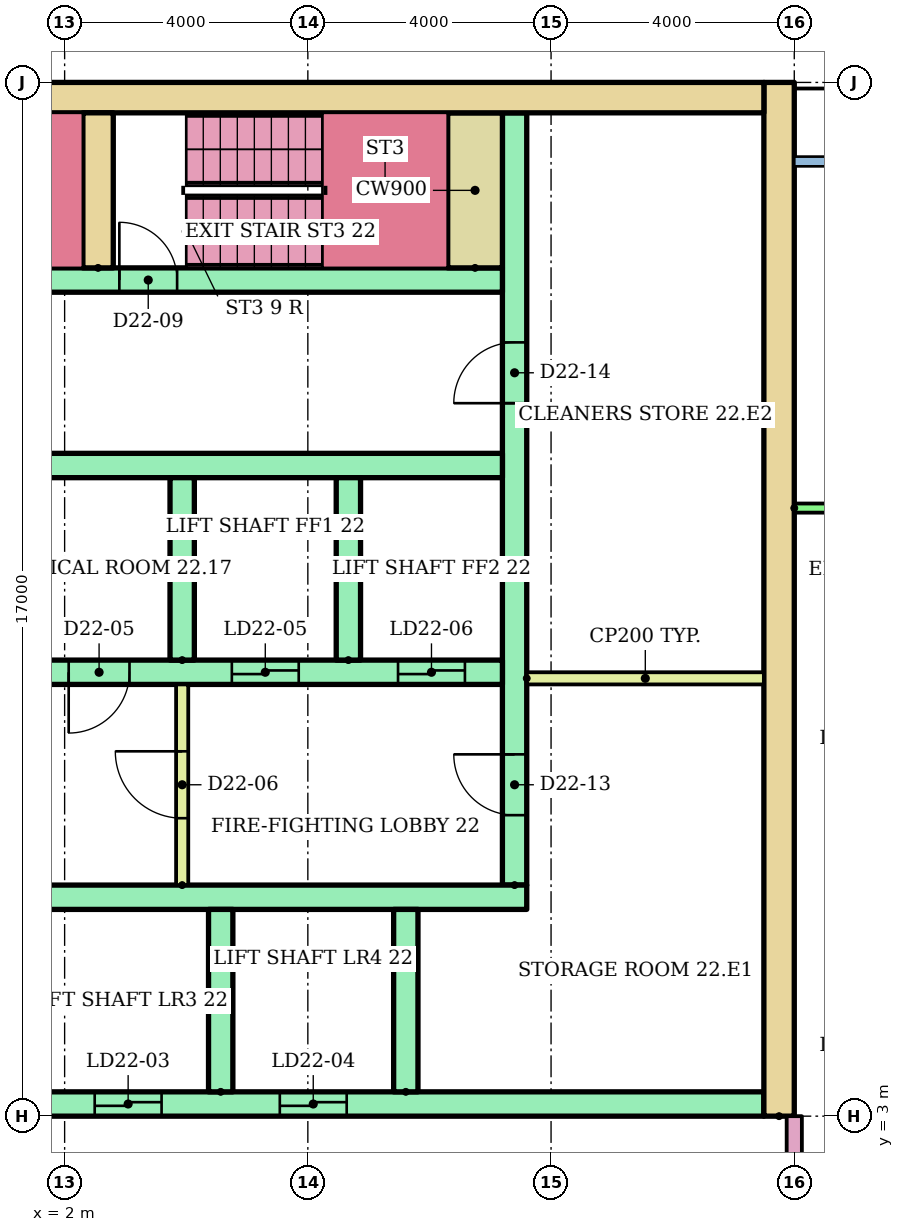
"""IFC4 building model, lengths in metres.
Left out: names, types, materials, properties, quantities, classifications, styles, units other than length and angle.
Written with IfcOpenShell. Run it as: python <this file> out.ifc"""

import sys

from ifc_helpers import new_model, si_unit, direction, frame, frame_2d, origin, place, context, subcontext, project, spatial, rectangle, extrude, element, fill, save


model = new_model("IFC4")
c1 = context("Model", 3, precision=1e-05, world=origin(), true_north=direction((0.0, 1.0)))
c2 = subcontext(c1, "Body", "Model", "MODEL_VIEW")
j1 = project(units=[si_unit("LENGTHUNIT", "METRE"), si_unit("PLANEANGLEUNIT", "RADIAN")], contexts=[c1])
p1 = place(None, origin())
s1 = spatial("IfcSite", under=j1, at=p1, CompositionType="ELEMENT")
p2 = place(p1, origin())
s2 = spatial("IfcBuilding", under=s1, at=p2, CompositionType="ELEMENT")
p3 = place(p2, frame((0.0, 0.0, 87.1)))
s3 = spatial("IfcBuildingStorey", under=s2, at=p3, CompositionType="ELEMENT", Elevation=87.1)
p4 = place(p3, frame((13.75, 3.0, 0.0), z_axis=(0.0, 0.0, 1.0), x_axis=(0.0, 1.0, 0.0)))
e1 = element("IfcWall", 1, at=p4, inside=s3, PredefinedType="SHEAR", context=c2, shape_type="SweptSolid", body=[
    extrude(rectangle(XDim=17.0, YDim=0.5, at=frame_2d((8.5, 0.0))), origin(), (0.0, 0.0, 1.0), 2.92),
])
p5 = place(p3, frame((-13.5, 19.75, 0.0)))
e2 = element("IfcWall", 2, at=p5, inside=s3, PredefinedType="SHEAR", context=c2, shape_type="SweptSolid", body=[
    extrude(rectangle(XDim=27.0, YDim=0.5, at=frame_2d((13.5, 0.0))), origin(), (0.0, 0.0, 1.0), 2.92),
])
p6 = place(p3, frame((9.4, 6.8, 0.0), z_axis=(0.0, 0.0, 1.0), x_axis=(0.0, 1.0, 0.0)))
e3 = element("IfcWall", 3, at=p6, inside=s3, PredefinedType="SHEAR", context=c2, shape_type="SweptSolid", body=[
    extrude(rectangle(XDim=12.7, YDim=0.4, at=frame_2d((6.35, 0.0))), origin(), (0.0, 0.0, 1.0), 2.92),
])
p7 = place(p6, frame((1.15, 0.0, 0.0)))
e4 = element("IfcOpeningElement", 4, at=p7, cuts=e3, PredefinedType="OPENING", context=c2, shape_type="SweptSolid", body=[
    extrude(rectangle(XDim=1.0, YDim=2.1, at=frame_2d((0.5, 1.05))), frame((0.0, 0.21, 0.0), z_axis=(0.0, -1.0, 0.0), x_axis=(1.0, 0.0, 0.0)), (0.0, 0.0, 1.0), 0.42),
])
p8 = place(p6, frame((7.925, 0.0, 0.0)))
e5 = element("IfcOpeningElement", 5, at=p8, cuts=e3, PredefinedType="OPENING", context=c2, shape_type="SweptSolid", body=[
    extrude(rectangle(XDim=1.0, YDim=2.1, at=frame_2d((0.5, 1.05))), frame((0.0, 0.21, 0.0), z_axis=(0.0, -1.0, 0.0), x_axis=(1.0, 0.0, 0.0)), (0.0, 0.0, 1.0), 0.42),
])
p9 = place(p3, frame((-13.5, 3.2, 0.0)))
e6 = element("IfcWall", 6, at=p9, inside=s3, PredefinedType="SHEAR", context=c2, shape_type="SweptSolid", body=[
    extrude(rectangle(XDim=27.0, YDim=0.4, at=frame_2d((13.5, 0.0))), origin(), (0.0, 0.0, 1.0), 2.92),
])
p10 = place(p9, frame((6.861, 0.0, 0.0)))
e7 = element("IfcOpeningElement", 7, at=p10, cuts=e6, PredefinedType="OPENING", context=c2, shape_type="SweptSolid", body=[
    extrude(rectangle(XDim=1.1, YDim=2.1, at=frame_2d((0.55, 1.05))), frame((0.0, 0.21, 0.0), z_axis=(0.0, -1.0, 0.0), x_axis=(1.0, 0.0, 0.0)), (0.0, 0.0, 1.0), 0.42),
])
p11 = place(p9, frame((9.906, 0.0, 0.0)))
e8 = element("IfcOpeningElement", 8, at=p11, cuts=e6, PredefinedType="OPENING", context=c2, shape_type="SweptSolid", body=[
    extrude(rectangle(XDim=1.1, YDim=2.1, at=frame_2d((0.55, 1.05))), frame((0.0, 0.21, 0.0), z_axis=(0.0, -1.0, 0.0), x_axis=(1.0, 0.0, 0.0)), (0.0, 0.0, 1.0), 0.42),
])
p12 = place(p9, frame((15.994, 0.0, 0.0)))
e9 = element("IfcOpeningElement", 9, at=p12, cuts=e6, PredefinedType="OPENING", context=c2, shape_type="SweptSolid", body=[
    extrude(rectangle(XDim=1.1, YDim=2.1, at=frame_2d((0.55, 1.05))), frame((0.0, 0.21, 0.0), z_axis=(0.0, -1.0, 0.0), x_axis=(1.0, 0.0, 0.0)), (0.0, 0.0, 1.0), 0.42),
])
p13 = place(p9, frame((19.039, 0.0, 0.0)))
e10 = element("IfcOpeningElement", 10, at=p13, cuts=e6, PredefinedType="OPENING", context=c2, shape_type="SweptSolid", body=[
    extrude(rectangle(XDim=1.1, YDim=2.1, at=frame_2d((0.55, 1.05))), frame((0.0, 0.21, 0.0), z_axis=(0.0, -1.0, 0.0), x_axis=(1.0, 0.0, 0.0)), (0.0, 0.0, 1.0), 0.42),
])
p14 = place(p9, frame((12.6, 0.0, 0.0)))
e11 = element("IfcOpeningElement", 11, at=p14, cuts=e6, PredefinedType="OPENING", context=c2, shape_type="SweptSolid", body=[
    extrude(rectangle(XDim=1.8, YDim=2.1, at=frame_2d((0.9, 1.05))), frame((0.0, 0.21, 0.0), z_axis=(0.0, -1.0, 0.0), x_axis=(1.0, 0.0, 0.0)), (0.0, 0.0, 1.0), 0.42),
])
p15 = place(p3, frame((1.522, 6.6, 0.0)))
e12 = element("IfcWall", 12, at=p15, inside=s3, PredefinedType="SHEAR", context=c2, shape_type="SweptSolid", body=[
    extrude(rectangle(XDim=8.078, YDim=0.4, at=frame_2d((4.039, 0.0))), origin(), (0.0, 0.0, 1.0), 2.92),
])
for number, where, z_axis, x_axis in (
    (13, (4.567, 3.4, 0.0), (0.0, 0.0, 1.0), (0.0, 1.0, 0.0)),
    (14, (7.611, 3.4, 0.0), (0.0, 0.0, 1.0), (0.0, 1.0, 0.0)),
):
    element("IfcWall", number, at=place(p3, frame(where, z_axis=z_axis, x_axis=x_axis)), inside=s3, PredefinedType="SHEAR", context=c2, shape_type="SweptSolid", body=[
        extrude(rectangle(XDim=3.0, YDim=0.4, at=frame_2d((1.5, 0.0))), origin(), (0.0, 0.0, 1.0), 2.92),
    ])
p16 = place(p3, frame((1.2, 10.3, 0.0)))
e15 = element("IfcWall", 15, at=p16, inside=s3, PredefinedType="SHEAR", context=c2, shape_type="SweptSolid", body=[
    extrude(rectangle(XDim=8.0, YDim=0.4, at=frame_2d((4.0, 0.0))), origin(), (0.0, 0.0, 1.0), 2.92),
])
p17 = place(p16, frame((3.55, 0.0, 0.0)))
e16 = element("IfcOpeningElement", 16, at=p17, cuts=e15, PredefinedType="OPENING", context=c2, shape_type="SweptSolid", body=[
    extrude(rectangle(XDim=1.1, YDim=2.1, at=frame_2d((0.55, 1.05))), frame((0.0, 0.21, 0.0), z_axis=(0.0, -1.0, 0.0), x_axis=(1.0, 0.0, 0.0)), (0.0, 0.0, 1.0), 0.42),
])
p18 = place(p16, frame((6.283, 0.0, 0.0)))
e17 = element("IfcOpeningElement", 17, at=p18, cuts=e15, PredefinedType="OPENING", context=c2, shape_type="SweptSolid", body=[
    extrude(rectangle(XDim=1.1, YDim=2.1, at=frame_2d((0.55, 1.05))), frame((0.0, 0.21, 0.0), z_axis=(0.0, -1.0, 0.0), x_axis=(1.0, 0.0, 0.0)), (0.0, 0.0, 1.0), 0.42),
])
p19 = place(p16, frame((0.867, 0.0, 0.0)))
e18 = element("IfcOpeningElement", 18, at=p19, cuts=e15, PredefinedType="OPENING", context=c2, shape_type="SweptSolid", body=[
    extrude(rectangle(XDim=1.0, YDim=2.1, at=frame_2d((0.5, 1.05))), frame((0.0, 0.21, 0.0), z_axis=(0.0, -1.0, 0.0), x_axis=(1.0, 0.0, 0.0)), (0.0, 0.0, 1.0), 0.42),
])
p20 = place(p3, frame((1.2, 13.7, 0.0)))
e19 = element("IfcWall", 19, at=p20, inside=s3, PredefinedType="SHEAR", context=c2, shape_type="SweptSolid", body=[
    extrude(rectangle(XDim=8.0, YDim=0.4, at=frame_2d((4.0, 0.0))), origin(), (0.0, 0.0, 1.0), 2.92),
])
for number, where, z_axis, x_axis in (
    (20, (3.933, 10.5, 0.0), (0.0, 0.0, 1.0), (0.0, 1.0, 0.0)),
    (21, (6.667, 10.5, 0.0), (0.0, 0.0, 1.0), (0.0, 1.0, 0.0)),
):
    element("IfcWall", number, at=place(p3, frame(where, z_axis=z_axis, x_axis=x_axis)), inside=s3, PredefinedType="SHEAR", context=c2, shape_type="SweptSolid", body=[
        extrude(rectangle(XDim=3.0, YDim=0.4, at=frame_2d((1.5, 0.0))), origin(), (0.0, 0.0, 1.0), 2.92),
    ])
p21 = place(p3, frame((3.933, 6.8, 0.0), z_axis=(0.0, 0.0, 1.0), x_axis=(0.0, 1.0, 0.0)))
e22 = element("IfcWall", 22, at=p21, inside=s3, PredefinedType="PARTITIONING", context=c2, shape_type="SweptSolid", body=[
    extrude(rectangle(XDim=3.3, YDim=0.2, at=frame_2d((1.65, 0.0))), origin(), (0.0, 0.0, 1.0), 2.92),
])
p22 = place(p21, frame((1.1, 0.0, 0.0)))
e23 = element("IfcOpeningElement", 23, at=p22, cuts=e22, PredefinedType="OPENING", context=c2, shape_type="SweptSolid", body=[
    extrude(rectangle(XDim=1.1, YDim=2.1, at=frame_2d((0.55, 1.05))), frame((0.0, 0.11, 0.0), z_axis=(0.0, -1.0, 0.0), x_axis=(1.0, 0.0, 0.0)), (0.0, 0.0, 1.0), 0.22),
])
p23 = place(p3, frame((-9.2, 16.75, 0.0)))
e24 = element("IfcWall", 24, at=p23, inside=s3, PredefinedType="SHEAR", context=c2, shape_type="SweptSolid", body=[
    extrude(rectangle(XDim=18.4, YDim=0.4, at=frame_2d((9.2, 0.0))), origin(), (0.0, 0.0, 1.0), 2.92),
])
p24 = place(p23, frame((0.1, 0.0, 0.0)))
e25 = element("IfcOpeningElement", 25, at=p24, cuts=e24, PredefinedType="OPENING", context=c2, shape_type="SweptSolid", body=[
    extrude(rectangle(XDim=0.95, YDim=2.1, at=frame_2d((0.475, 1.05))), frame((0.0, 0.21, 0.0), z_axis=(0.0, -1.0, 0.0), x_axis=(1.0, 0.0, 0.0)), (0.0, 0.0, 1.0), 0.42),
])
p25 = place(p23, frame((6.1, 0.0, 0.0)))
e26 = element("IfcOpeningElement", 26, at=p25, cuts=e24, PredefinedType="OPENING", context=c2, shape_type="SweptSolid", body=[
    extrude(rectangle(XDim=0.95, YDim=2.1, at=frame_2d((0.475, 1.05))), frame((0.0, 0.21, 0.0), z_axis=(0.0, -1.0, 0.0), x_axis=(1.0, 0.0, 0.0)), (0.0, 0.0, 1.0), 0.42),
])
p26 = place(p23, frame((12.1, 0.0, 0.0)))
e27 = element("IfcOpeningElement", 27, at=p26, cuts=e24, PredefinedType="OPENING", context=c2, shape_type="SweptSolid", body=[
    extrude(rectangle(XDim=0.95, YDim=2.1, at=frame_2d((0.475, 1.05))), frame((0.0, 0.21, 0.0), z_axis=(0.0, -1.0, 0.0), x_axis=(1.0, 0.0, 0.0)), (0.0, 0.0, 1.0), 0.42),
])
p27 = place(p3, frame((2.55, 16.95, 0.0), z_axis=(0.0, 0.0, 1.0), x_axis=(0.0, 1.0, 0.0)))
e28 = element("IfcWall", 28, at=p27, inside=s3, PredefinedType="SHEAR", context=c2, shape_type="SweptSolid", body=[
    extrude(rectangle(XDim=2.55, YDim=0.5, at=frame_2d((1.275, 0.0))), origin(), (0.0, 0.0, 1.0), 2.92),
])
p28 = place(p3, frame((8.75, 16.95, 0.0), z_axis=(0.0, 0.0, 1.0), x_axis=(0.0, 1.0, 0.0)))
e29 = element("IfcWall", 29, at=p28, inside=s3, PredefinedType="SHEAR", context=c2, shape_type="SweptSolid", body=[
    extrude(rectangle(XDim=2.55, YDim=0.9, at=frame_2d((1.275, 0.0))), origin(), (0.0, 0.0, 1.0), 2.92),
])
p29 = place(p3, frame((9.6, 10.2, 0.0)))
e30 = element("IfcWall", 30, at=p29, inside=s3, PredefinedType="PARTITIONING", context=c2, shape_type="SweptSolid", body=[
    extrude(rectangle(XDim=3.9, YDim=0.2, at=frame_2d((1.95, 0.0))), origin(), (0.0, 0.0, 1.0), 2.92),
])
p30 = place(p3, frame((14.0, 13.0, 0.0)))
e31 = element("IfcWall", 31, at=p30, inside=s3, PredefinedType="PARTITIONING", context=c2, shape_type="SweptSolid", body=[
    extrude(rectangle(XDim=12.0, YDim=0.15, at=frame_2d((6.0, 0.0))), origin(), (0.0, 0.0, 1.0), 2.4),
])
p31 = place(p30, frame((1.5, 0.0, 0.0)))
e32 = element("IfcOpeningElement", 32, at=p31, cuts=e31, PredefinedType="OPENING", context=c2, shape_type="SweptSolid", body=[
    extrude(rectangle(XDim=1.0, YDim=2.1, at=frame_2d((0.5, 1.05))), frame((0.0, 0.085, 0.0), z_axis=(0.0, -1.0, 0.0), x_axis=(1.0, 0.0, 0.0)), (0.0, 0.0, 1.0), 0.17),
])
p32 = place(p30, frame((7.55, 0.0, 0.0)))
e33 = element("IfcOpeningElement", 33, at=p32, cuts=e31, PredefinedType="OPENING", context=c2, shape_type="SweptSolid", body=[
    extrude(rectangle(XDim=0.9, YDim=2.1, at=frame_2d((0.45, 1.05))), frame((0.0, 0.085, 0.0), z_axis=(0.0, -1.0, 0.0), x_axis=(1.0, 0.0, 0.0)), (0.0, 0.0, 1.0), 0.17),
])
p33 = place(p3, frame((14.0, 1.4, 0.0), z_axis=(0.0, 0.0, 1.0), x_axis=(0.0, 1.0, 0.0)))
e34 = element("IfcWall", 34, at=p33, inside=s3, PredefinedType="PARTITIONING", context=c2, shape_type="SweptSolid", body=[
    extrude(rectangle(XDim=1.6, YDim=0.25, at=frame_2d((0.8, 0.0))), origin(), (0.0, 0.0, 1.0), 2.4),
])
p34 = place(p12, origin())
e35 = element("IfcDoor", 35, at=p34, inside=s3, OperationType="SLIDING_TO_LEFT", PredefinedType="DOOR", context=c2, shape_type="SweptSolid", body=[
    extrude(rectangle(XDim=1.1, YDim=2.1, at=frame_2d((0.55, 1.05))), frame((0.0, 0.025, 0.0), z_axis=(0.0, -1.0, 0.0), x_axis=(1.0, 0.0, 0.0)), (0.0, 0.0, 1.0), 0.05),
])
fill(e9, e35)
p35 = place(p13, origin())
e36 = element("IfcDoor", 36, at=p35, inside=s3, OperationType="SLIDING_TO_LEFT", PredefinedType="DOOR", context=c2, shape_type="SweptSolid", body=[
    extrude(rectangle(XDim=1.1, YDim=2.1, at=frame_2d((0.55, 1.05))), frame((0.0, 0.025, 0.0), z_axis=(0.0, -1.0, 0.0), x_axis=(1.0, 0.0, 0.0)), (0.0, 0.0, 1.0), 0.05),
])
fill(e10, e36)
p36 = place(p17, origin())
e37 = element("IfcDoor", 37, at=p36, inside=s3, OperationType="SLIDING_TO_LEFT", PredefinedType="DOOR", context=c2, shape_type="SweptSolid", body=[
    extrude(rectangle(XDim=1.1, YDim=2.1, at=frame_2d((0.55, 1.05))), frame((0.0, 0.025, 0.0), z_axis=(0.0, -1.0, 0.0), x_axis=(1.0, 0.0, 0.0)), (0.0, 0.0, 1.0), 0.05),
])
fill(e16, e37)
p37 = place(p18, origin())
e38 = element("IfcDoor", 38, at=p37, inside=s3, OperationType="SLIDING_TO_LEFT", PredefinedType="DOOR", context=c2, shape_type="SweptSolid", body=[
    extrude(rectangle(XDim=1.1, YDim=2.1, at=frame_2d((0.55, 1.05))), frame((0.0, 0.025, 0.0), z_axis=(0.0, -1.0, 0.0), x_axis=(1.0, 0.0, 0.0)), (0.0, 0.0, 1.0), 0.05),
])
fill(e17, e38)
p38 = place(p19, frame((1.0, 0.0, 0.0), z_axis=(0.0, 0.0, 1.0), x_axis=(-1.0, 0.0, 0.0)))
e39 = element("IfcDoor", 39, at=p38, inside=s3, OperationType="SINGLE_SWING_LEFT", PredefinedType="DOOR", context=c2, shape_type="SweptSolid", body=[
    extrude(rectangle(XDim=1.0, YDim=2.1, at=frame_2d((0.5, 1.05))), frame((0.0, 0.025, 0.0), z_axis=(0.0, -1.0, 0.0), x_axis=(1.0, 0.0, 0.0)), (0.0, 0.0, 1.0), 0.05),
])
fill(e18, e39)
p39 = place(p22, origin())
e40 = element("IfcDoor", 40, at=p39, inside=s3, OperationType="SINGLE_SWING_RIGHT", PredefinedType="DOOR", context=c2, shape_type="SweptSolid", body=[
    extrude(rectangle(XDim=1.1, YDim=2.1, at=frame_2d((0.55, 1.05))), frame((0.0, 0.025, 0.0), z_axis=(0.0, -1.0, 0.0), x_axis=(1.0, 0.0, 0.0)), (0.0, 0.0, 1.0), 0.05),
])
fill(e23, e40)
p40 = place(p26, origin())
e41 = element("IfcDoor", 41, at=p40, inside=s3, OperationType="SINGLE_SWING_LEFT", PredefinedType="DOOR", context=c2, shape_type="SweptSolid", body=[
    extrude(rectangle(XDim=0.95, YDim=2.1, at=frame_2d((0.475, 1.05))), frame((0.0, 0.025, 0.0), z_axis=(0.0, -1.0, 0.0), x_axis=(1.0, 0.0, 0.0)), (0.0, 0.0, 1.0), 0.05),
])
fill(e27, e41)
p41 = place(p7, origin())
e42 = element("IfcDoor", 42, at=p41, inside=s3, OperationType="SINGLE_SWING_RIGHT", PredefinedType="DOOR", context=c2, shape_type="SweptSolid", body=[
    extrude(rectangle(XDim=1.0, YDim=2.1, at=frame_2d((0.5, 1.05))), frame((0.0, 0.025, 0.0), z_axis=(0.0, -1.0, 0.0), x_axis=(1.0, 0.0, 0.0)), (0.0, 0.0, 1.0), 0.05),
])
fill(e4, e42)
p42 = place(p8, origin())
e43 = element("IfcDoor", 43, at=p42, inside=s3, OperationType="SINGLE_SWING_LEFT", PredefinedType="DOOR", context=c2, shape_type="SweptSolid", body=[
    extrude(rectangle(XDim=1.0, YDim=2.1, at=frame_2d((0.5, 1.05))), frame((0.0, 0.025, 0.0), z_axis=(0.0, -1.0, 0.0), x_axis=(1.0, 0.0, 0.0)), (0.0, 0.0, 1.0), 0.05),
])
fill(e5, e43)
save(model, sys.argv[1])
